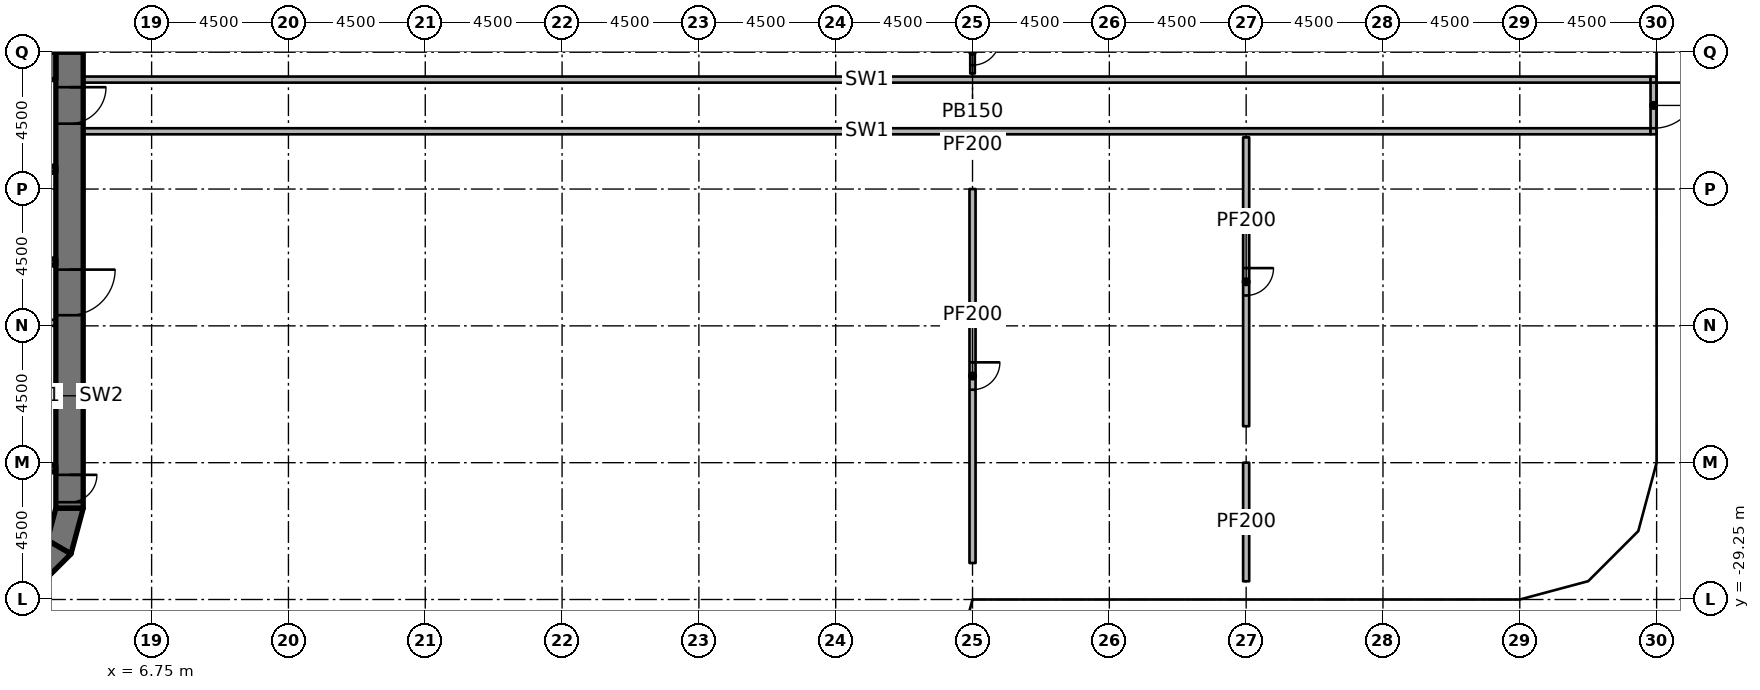
"""IFC4 building model, lengths in metres.
Left out: names, types, materials, properties, quantities, classifications, styles, units other than length and angle.
Written with IfcOpenShell. Run it as: python <this file> out.ifc"""

import sys

from ifc_helpers import new_model, si_unit, direction, frame, frame_2d, origin, origin_2d, place, context, subcontext, project, spatial, polyline, rectangle, outline, extrude, element, fill, save


model = new_model("IFC4")
c1 = context("Model", 3, precision=1e-05, world=origin(), true_north=direction((0.0, 1.0)))
c2 = subcontext(c1, "Body", "Model", "MODEL_VIEW")
j1 = project(units=[si_unit("LENGTHUNIT", "METRE"), si_unit("PLANEANGLEUNIT", "RADIAN")], contexts=[c1])
p1 = place(None, origin())
s1 = spatial("IfcSite", under=j1, at=p1, CompositionType="ELEMENT")
p2 = place(p1, origin())
s2 = spatial("IfcBuilding", under=s1, at=p2, CompositionType="ELEMENT")
p3 = place(p2, origin())
s3 = spatial("IfcBuildingStorey", under=s2, at=p3, CompositionType="ELEMENT", Elevation=0.0)
for number, where, z_axis, x_axis in (
    (1, (6.25, -26.9, 0.0), (0.0, 0.0, 1.0), (1.0, 0.0, 0.0)),
    (2, (6.25, -24.65, 0.0), (0.0, 0.0, 1.0), (1.0, 0.0, 0.0)),
    (3, (6.25, -20.25, 0.0), (0.0, 0.0, 1.0), (1.0, 0.0, 0.0)),
    (4, (6.25, -15.75, 0.0), (0.0, 0.0, 1.0), (1.0, 0.0, 0.0)),
    (5, (6.25, -10.75, 0.0), (0.0, 0.0, 1.0), (1.0, 0.0, 0.0)),
    (6, (10.65, -20.25, 0.0), (0.0, 0.0, 1.0), (1.0, 0.0, 0.0)),
    (7, (10.65, -15.15, 0.0), (0.0, 0.0, 1.0), (1.0, 0.0, 0.0)),
    (8, (15.15, -24.75, 0.0), (0.0, 0.0, 1.0), (1.0, 0.0, 0.0)),
    (9, (15.15, -19.65, 0.0), (0.0, 0.0, 1.0), (1.0, 0.0, 0.0)),
    (10, (19.65, -29.25, 0.0), (0.0, 0.0, 1.0), (1.0, 0.0, 0.0)),
    (11, (19.65, -24.15, 0.0), (0.0, 0.0, 1.0), (1.0, 0.0, 0.0)),
    (12, (19.65, -15.15, 0.0), (0.0, 0.0, 1.0), (1.0, 0.0, 0.0)),
    (13, (24.15, -28.65, 0.0), (0.0, 0.0, 1.0), (1.0, 0.0, 0.0)),
    (14, (24.15, -19.65, 0.0), (0.0, 0.0, 1.0), (1.0, 0.0, 0.0)),
    (15, (28.65, -24.15, 0.0), (0.0, 0.0, 1.0), (1.0, 0.0, 0.0)),
    (16, (33.15, -28.65, 0.0), (0.0, 0.0, 1.0), (1.0, 0.0, 0.0)),
    (17, (33.75, -15.15, 0.0), (0.0, 0.0, 1.0), (1.0, 0.0, 0.0)),
    (18, (38.25, -19.65, 0.0), (0.0, 0.0, 1.0), (1.0, 0.0, 0.0)),
    (19, (42.75, -24.15, 0.0), (0.0, 0.0, 1.0), (1.0, 0.0, 0.0)),
    (20, (41.97, -11.25, 0.0), (0.0, 0.0, 1.0), (1.0, 0.0, 0.0)),
    (21, (47.25, -28.65, 0.0), (0.0, 0.0, 1.0), (1.0, 0.0, 0.0)),
    (22, (46.47, -15.75, 0.0), (0.0, 0.0, 1.0), (1.0, 0.0, 0.0)),
    (23, (50.97, -20.25, 0.0), (0.0, 0.0, 1.0), (1.0, 0.0, 0.0)),
    (24, (55.47, -24.75, 0.0), (0.0, 0.0, 1.0), (1.0, 0.0, 0.0)),
    (25, (55.65, -11.25, 0.0), (0.0, 0.0, 1.0), (1.0, 0.0, 0.0)),
):
    element("IfcColumn", number, at=place(p3, frame(where, z_axis=z_axis, x_axis=x_axis)), inside=s3, PredefinedType="COLUMN", context=c2, shape_type="SweptSolid", body=[
        extrude(rectangle(XDim=1.2, YDim=1.2, at=origin_2d()), origin(), (0.0, 0.0, 1.0), 6.55),
    ])
p4 = place(p3, frame((4.05, -11.25, 0.0), z_axis=(0.0, 0.0, 1.0), x_axis=(0.0, -1.0, 0.0)))
e26 = element("IfcWall", 26, at=p4, inside=s3, PredefinedType="SHEAR", context=c2, shape_type="SweptSolid", body=[
    extrude(rectangle(XDim=15.0, YDim=0.9, at=frame_2d((7.5, 0.0))), origin(), (0.0, 0.0, 1.0), 7.0),
])
p5 = place(p4, frame((7.15, 0.0, 0.0)))
e27 = element("IfcOpeningElement", 27, at=p5, cuts=e26, PredefinedType="OPENING", context=c2, shape_type="SweptSolid", body=[
    extrude(rectangle(XDim=1.5, YDim=2.3, at=frame_2d((0.75, 1.15))), frame((0.0, 0.46, 0.0), z_axis=(0.0, -1.0, 0.0), x_axis=(1.0, 0.0, 0.0)), (0.0, 0.0, 1.0), 0.92),
])
p6 = place(p4, frame((13.9, 0.0, 0.0)))
e28 = element("IfcOpeningElement", 28, at=p6, cuts=e26, PredefinedType="OPENING", context=c2, shape_type="SweptSolid", body=[
    extrude(rectangle(XDim=0.9, YDim=2.1, at=frame_2d((0.45, 1.05))), frame((0.0, 0.46, 0.0), z_axis=(0.0, -1.0, 0.0), x_axis=(1.0, 0.0, 0.0)), (0.0, 0.0, 1.0), 0.92),
])
p7 = place(p4, frame((1.15, 0.0, 0.0)))
e29 = element("IfcOpeningElement", 29, at=p7, cuts=e26, PredefinedType="OPENING", context=c2, shape_type="SweptSolid", body=[
    extrude(rectangle(XDim=1.2, YDim=2.1, at=frame_2d((0.6, 1.05))), frame((0.0, 0.46, 0.0), z_axis=(0.0, -1.0, 0.0), x_axis=(1.0, 0.0, 0.0)), (0.0, 0.0, 1.0), 0.92),
])
p8 = place(p3, frame((-3.6, -11.7, 0.0), z_axis=(0.0, 0.0, 1.0), x_axis=(1.0, 0.0, 0.0)))
e30 = element("IfcWall", 30, at=p8, inside=s3, PredefinedType="SHEAR", context=c2, shape_type="SweptSolid", body=[
    extrude(rectangle(XDim=7.2, YDim=0.9, at=frame_2d((3.6, 0.0))), origin(), (0.0, 0.0, 1.0), 7.0),
])
p9 = place(p3, origin())
e31 = element("IfcWall", 31, at=p9, inside=s3, PredefinedType="SHEAR", context=c2, shape_type="SweptSolid", body=[
    extrude(outline(polyline([(4.5, -26.25), (4.098, -27.75), (3.319, -27.3), (3.6, -26.25), (4.5, -26.25)])), origin(), (0.0, 0.0, 1.0), 7.0),
])
p10 = place(p3, origin())
e32 = element("IfcWall", 32, at=p10, inside=s3, PredefinedType="SHEAR", context=c2, shape_type="SweptSolid", body=[
    extrude(outline(polyline([(4.098, -27.75), (3.0, -28.848), (2.55, -28.069), (3.319, -27.3), (4.098, -27.75)])), origin(), (0.0, 0.0, 1.0), 7.0),
])
for number, where, z_axis, x_axis in (
    (33, (3.6, -24.95, 0.0), (0.0, 0.0, 1.0), (-1.0, 0.0, 0.0)),
    (34, (3.6, -18.15, 0.0), (0.0, 0.0, 1.0), (-1.0, 0.0, 0.0)),
    (35, (3.6, -15.1, 0.0), (0.0, 0.0, 1.0), (-1.0, 0.0, 0.0)),
):
    element("IfcWall", number, at=place(p3, frame(where, z_axis=z_axis, x_axis=x_axis)), inside=s3, PredefinedType="SHEAR", context=c2, shape_type="SweptSolid", body=[
        extrude(rectangle(XDim=7.2, YDim=0.2, at=frame_2d((3.6, 0.0))), origin(), (0.0, 0.0, 1.0), 6.55),
    ])
p11 = place(p3, frame((3.6, -20.15, 0.0), z_axis=(0.0, 0.0, 1.0), x_axis=(-1.0, 0.0, 0.0)))
e36 = element("IfcWall", 36, at=p11, inside=s3, PredefinedType="PARTITIONING", context=c2, shape_type="SweptSolid", body=[
    extrude(rectangle(XDim=2.7, YDim=0.2, at=frame_2d((1.35, 0.0))), origin(), (0.0, 0.0, 1.0), 6.55),
])
p12 = place(p3, frame((3.6, -22.55, 0.0), z_axis=(0.0, 0.0, 1.0), x_axis=(-1.0, 0.0, 0.0)))
e37 = element("IfcWall", 37, at=p12, inside=s3, PredefinedType="PARTITIONING", context=c2, shape_type="SweptSolid", body=[
    extrude(rectangle(XDim=2.5, YDim=0.1, at=frame_2d((1.25, 0.0))), origin(), (0.0, 0.0, 1.0), 6.55),
])
for number, where, z_axis, x_axis in (
    (38, (4.5, -12.15, 0.0), (0.0, 0.0, 1.0), (1.0, 0.0, 0.0)),
    (39, (4.5, -13.85, 0.0), (0.0, 0.0, 1.0), (1.0, 0.0, 0.0)),
):
    element("IfcWall", number, at=place(p3, frame(where, z_axis=z_axis, x_axis=x_axis)), inside=s3, PredefinedType="PARTITIONING", context=c2, shape_type="SweptSolid", body=[
        extrude(rectangle(XDim=51.55, YDim=0.2, at=frame_2d((25.775, 0.0))), origin(), (0.0, 0.0, 1.0), 6.55),
    ])
p13 = place(p3, frame((56.15, -12.05, 0.0), z_axis=(0.0, 0.0, 1.0), x_axis=(0.0, -1.0, 0.0)))
e40 = element("IfcWall", 40, at=p13, inside=s3, PredefinedType="PARTITIONING", context=c2, shape_type="SweptSolid", body=[
    extrude(rectangle(XDim=1.9, YDim=0.2, at=frame_2d((0.95, 0.0))), origin(), (0.0, 0.0, 1.0), 6.55),
])
p14 = place(p13, frame((0.2, 0.0, 0.0)))
e41 = element("IfcOpeningElement", 41, at=p14, cuts=e40, PredefinedType="OPENING", context=c2, shape_type="SweptSolid", body=[
    extrude(rectangle(XDim=1.5, YDim=2.1, at=frame_2d((0.75, 1.05))), frame((0.0, 0.11, 0.0), z_axis=(0.0, -1.0, 0.0), x_axis=(1.0, 0.0, 0.0)), (0.0, 0.0, 1.0), 0.22),
])
p15 = place(p3, frame((33.75, -10.5, 0.0), z_axis=(0.0, 0.0, 1.0), x_axis=(0.0, -1.0, 0.0)))
e42 = element("IfcWall", 42, at=p15, inside=s3, PredefinedType="PARTITIONING", context=c2, shape_type="SweptSolid", body=[
    extrude(rectangle(XDim=1.45, YDim=0.15, at=frame_2d((0.725, 0.0))), origin(), (0.0, 0.0, 1.0), 6.55),
])
p16 = place(p15, frame((0.275, 0.0, 0.0)))
e43 = element("IfcOpeningElement", 43, at=p16, cuts=e42, PredefinedType="OPENING", context=c2, shape_type="SweptSolid", body=[
    extrude(rectangle(XDim=0.9, YDim=2.1, at=frame_2d((0.45, 1.05))), frame((0.0, 0.085, 0.0), z_axis=(0.0, -1.0, 0.0), x_axis=(1.0, 0.0, 0.0)), (0.0, 0.0, 1.0), 0.17),
])
p17 = place(p3, frame((42.75, -28.65, 0.0), z_axis=(0.0, 0.0, 1.0), x_axis=(0.0, 1.0, 0.0)))
e44 = element("IfcWall", 44, at=p17, inside=s3, PredefinedType="PARTITIONING", context=c2, shape_type="SweptSolid", body=[
    extrude(rectangle(XDim=3.9, YDim=0.2, at=frame_2d((1.95, 0.0))), origin(), (0.0, 0.0, 1.0), 6.55),
])
p18 = place(p3, frame((42.75, -14.05, 0.0), z_axis=(0.0, 0.0, 1.0), x_axis=(0.0, -1.0, 0.0)))
e45 = element("IfcWall", 45, at=p18, inside=s3, PredefinedType="PARTITIONING", context=c2, shape_type="SweptSolid", body=[
    extrude(rectangle(XDim=9.5, YDim=0.2, at=frame_2d((4.75, 0.0))), origin(), (0.0, 0.0, 1.0), 6.55),
])
p19 = place(p18, frame((4.3, 0.0, 0.0)))
e46 = element("IfcOpeningElement", 46, at=p19, cuts=e45, PredefinedType="OPENING", context=c2, shape_type="SweptSolid", body=[
    extrude(rectangle(XDim=0.9, YDim=2.1, at=frame_2d((0.45, 1.05))), frame((0.0, 0.11, 0.0), z_axis=(0.0, -1.0, 0.0), x_axis=(1.0, 0.0, 0.0)), (0.0, 0.0, 1.0), 0.22),
])
p20 = place(p3, frame((33.75, -15.75, 0.0), z_axis=(0.0, 0.0, 1.0), x_axis=(0.0, -1.0, 0.0)))
e47 = element("IfcWall", 47, at=p20, inside=s3, PredefinedType="PARTITIONING", context=c2, shape_type="SweptSolid", body=[
    extrude(rectangle(XDim=12.3, YDim=0.2, at=frame_2d((6.15, 0.0))), origin(), (0.0, 0.0, 1.0), 6.55),
])
p21 = place(p20, frame((5.7, 0.0, 0.0)))
e48 = element("IfcOpeningElement", 48, at=p21, cuts=e47, PredefinedType="OPENING", context=c2, shape_type="SweptSolid", body=[
    extrude(rectangle(XDim=0.9, YDim=2.1, at=frame_2d((0.45, 1.05))), frame((0.0, 0.11, 0.0), z_axis=(0.0, -1.0, 0.0), x_axis=(1.0, 0.0, 0.0)), (0.0, 0.0, 1.0), 0.22),
])
p22 = place(p3, frame((33.75, -14.55, 0.0), z_axis=(0.0, 0.0, 1.0), x_axis=(0.0, 1.0, 0.0)))
e49 = element("IfcWall", 49, at=p22, inside=s3, PredefinedType="PARTITIONING", context=c2, shape_type="SweptSolid", body=[
    extrude(rectangle(XDim=0.5, YDim=0.2, at=frame_2d((0.25, 0.0))), origin(), (0.0, 0.0, 1.0), 6.55),
])
p23 = place(p5, origin())
e50 = element("IfcDoor", 50, at=p23, inside=s3, OperationType="DOUBLE_DOOR_SINGLE_SWING", PredefinedType="DOOR", context=c2, shape_type="SweptSolid", body=[
    extrude(rectangle(XDim=1.5, YDim=2.3, at=frame_2d((0.75, 1.15))), frame((0.0, 0.025, 0.0), z_axis=(0.0, -1.0, 0.0), x_axis=(1.0, 0.0, 0.0)), (0.0, 0.0, 1.0), 0.05),
])
fill(e27, e50)
p24 = place(p6, origin())
e51 = element("IfcDoor", 51, at=p24, inside=s3, OperationType="SINGLE_SWING_LEFT", PredefinedType="DOOR", context=c2, shape_type="SweptSolid", body=[
    extrude(rectangle(XDim=0.9, YDim=2.1, at=frame_2d((0.45, 1.05))), frame((0.0, 0.025, 0.0), z_axis=(0.0, -1.0, 0.0), x_axis=(1.0, 0.0, 0.0)), (0.0, 0.0, 1.0), 0.05),
])
fill(e28, e51)
p25 = place(p7, origin())
e52 = element("IfcDoor", 52, at=p25, inside=s3, OperationType="SINGLE_SWING_RIGHT", PredefinedType="DOOR", context=c2, shape_type="SweptSolid", body=[
    extrude(rectangle(XDim=1.2, YDim=2.1, at=frame_2d((0.6, 1.05))), frame((0.0, 0.025, 0.0), z_axis=(0.0, -1.0, 0.0), x_axis=(1.0, 0.0, 0.0)), (0.0, 0.0, 1.0), 0.05),
])
fill(e29, e52)
p26 = place(p14, origin())
e53 = element("IfcDoor", 53, at=p26, inside=s3, OperationType="DOUBLE_DOOR_DOUBLE_SWING", PredefinedType="DOOR", context=c2, shape_type="SweptSolid", body=[
    extrude(rectangle(XDim=1.5, YDim=2.1, at=frame_2d((0.75, 1.05))), frame((0.0, 0.025, 0.0), z_axis=(0.0, -1.0, 0.0), x_axis=(1.0, 0.0, 0.0)), (0.0, 0.0, 1.0), 0.05),
])
fill(e41, e53)
p27 = place(p16, origin())
e54 = element("IfcDoor", 54, at=p27, inside=s3, OperationType="SINGLE_SWING_LEFT", PredefinedType="DOOR", context=c2, shape_type="SweptSolid", body=[
    extrude(rectangle(XDim=0.9, YDim=2.1, at=frame_2d((0.45, 1.05))), frame((0.0, 0.025, 0.0), z_axis=(0.0, -1.0, 0.0), x_axis=(1.0, 0.0, 0.0)), (0.0, 0.0, 1.0), 0.05),
])
fill(e43, e54)
p28 = place(p19, origin())
e55 = element("IfcDoor", 55, at=p28, inside=s3, OperationType="SINGLE_SWING_LEFT", PredefinedType="DOOR", context=c2, shape_type="SweptSolid", body=[
    extrude(rectangle(XDim=0.9, YDim=2.1, at=frame_2d((0.45, 1.05))), frame((0.0, 0.025, 0.0), z_axis=(0.0, -1.0, 0.0), x_axis=(1.0, 0.0, 0.0)), (0.0, 0.0, 1.0), 0.05),
])
fill(e46, e55)
p29 = place(p21, origin())
e56 = element("IfcDoor", 56, at=p29, inside=s3, OperationType="SINGLE_SWING_LEFT", PredefinedType="DOOR", context=c2, shape_type="SweptSolid", body=[
    extrude(rectangle(XDim=0.9, YDim=2.1, at=frame_2d((0.45, 1.05))), frame((0.0, 0.025, 0.0), z_axis=(0.0, -1.0, 0.0), x_axis=(1.0, 0.0, 0.0)), (0.0, 0.0, 1.0), 0.05),
])
fill(e48, e56)
save(model, sys.argv[1])
